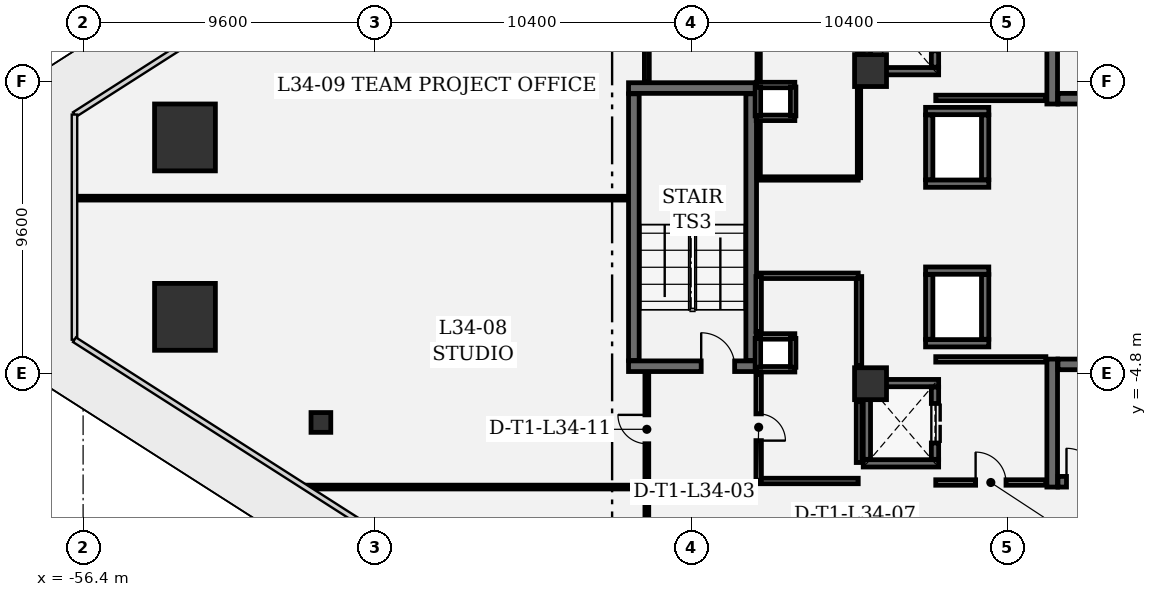
"""IFC4 building model, lengths in metres.
Left out: names, types, materials, properties, quantities, classifications, styles, units other than length and angle.
Written with IfcOpenShell. Run it as: python <this file> out.ifc"""

import sys

from ifc_helpers import new_model, si_unit, direction, frame, frame_2d, origin, origin_2d, place, context, subcontext, project, spatial, rectangle, extrude, element, fill, save


model = new_model("IFC4")
c1 = context("Model", 3, precision=1e-05, world=origin(), true_north=direction((0.0, 1.0)))
c2 = subcontext(c1, "Body", "Model", "MODEL_VIEW")
j1 = project(units=[si_unit("LENGTHUNIT", "METRE"), si_unit("PLANEANGLEUNIT", "RADIAN")], contexts=[c1])
p1 = place(None, origin())
s1 = spatial("IfcSite", under=j1, at=p1, CompositionType="ELEMENT")
p2 = place(p1, origin())
s2 = spatial("IfcBuilding", under=s1, at=p2, CompositionType="ELEMENT")
p3 = place(p2, frame((0.0, 0.0, 150.3)))
s3 = spatial("IfcBuildingStorey", under=s2, at=p3, CompositionType="ELEMENT", Elevation=150.3)
for number, where, z_axis, x_axis in (
    (1, (-53.049, 2.951, 0.0), (0.0, 0.0, 1.0), (1.0, 0.0, 0.0)),
    (2, (-53.049, -2.951, 0.0), (0.0, 0.0, 1.0), (1.0, 0.0, 0.0)),
):
    element("IfcColumn", number, at=place(p3, frame(where, z_axis=z_axis, x_axis=x_axis)), inside=s3, PredefinedType="COLUMN", context=c2, shape_type="SweptSolid", body=[
        extrude(rectangle(XDim=2.0, YDim=2.2, at=origin_2d()), origin(), (0.0, 0.0, 1.0), 4.05),
    ])
for number, where, z_axis, x_axis in (
    (3, (-30.5, 5.15, 0.0), (0.0, 0.0, 1.0), (1.0, 0.0, 0.0)),
    (4, (-30.5, -5.15, 0.0), (0.0, 0.0, 1.0), (1.0, 0.0, 0.0)),
):
    element("IfcColumn", number, at=place(p3, frame(where, z_axis=z_axis, x_axis=x_axis)), inside=s3, PredefinedType="COLUMN", context=c2, shape_type="SweptSolid", body=[
        extrude(rectangle(XDim=1.05, YDim=1.05, at=origin_2d()), origin(), (0.0, 0.0, 1.0), 4.05),
    ])
p4 = place(p3, frame((-48.578, -6.425, 0.0), z_axis=(0.0, 0.0, 1.0), x_axis=(1.0, 0.0, 0.0)))
e5 = element("IfcColumn", 5, at=p4, inside=s3, PredefinedType="COLUMN", context=c2, shape_type="SweptSolid", body=[
    extrude(rectangle(XDim=0.65, YDim=0.65, at=origin_2d()), origin(), (0.0, 0.0, 1.0), 4.05),
])
p5 = place(p3, frame((-24.525, 8.26, 0.0), z_axis=(0.0, 0.0, 1.0), x_axis=(0.0, -1.0, 0.0)))
e6 = element("IfcWall", 6, at=p5, inside=s3, PredefinedType="SHEAR", context=c2, shape_type="SweptSolid", body=[
    extrude(rectangle(XDim=4.21, YDim=0.35, at=frame_2d((2.105, 0.0))), origin(), (0.0, 0.0, 1.0), 3.78),
])
p6 = place(p3, frame((-24.335, 4.225, 0.0), z_axis=(0.0, 0.0, 1.0), x_axis=(1.0, 0.0, 0.0)))
e7 = element("IfcWall", 7, at=p6, inside=s3, PredefinedType="SHEAR", context=c2, shape_type="SweptSolid", body=[
    extrude(rectangle(XDim=8.12, YDim=0.35, at=frame_2d((4.06, 0.0))), origin(), (0.0, 0.0, 1.0), 3.78),
])
p7 = place(p3, frame((-24.525, -4.34, 0.0), z_axis=(0.0, 0.0, 1.0), x_axis=(0.0, -1.0, 0.0)))
e8 = element("IfcWall", 8, at=p7, inside=s3, PredefinedType="SHEAR", context=c2, shape_type="SweptSolid", body=[
    extrude(rectangle(XDim=4.21, YDim=0.35, at=frame_2d((2.105, 0.0))), origin(), (0.0, 0.0, 1.0), 3.78),
])
p8 = place(p3, frame((-24.335, -8.375, 0.0), z_axis=(0.0, 0.0, 1.0), x_axis=(1.0, 0.0, 0.0)))
e9 = element("IfcWall", 9, at=p8, inside=s3, PredefinedType="SHEAR", context=c2, shape_type="SweptSolid", body=[
    extrude(rectangle(XDim=8.12, YDim=0.35, at=frame_2d((4.06, 0.0))), origin(), (0.0, 0.0, 1.0), 3.78),
])
p9 = place(p8, frame((0.28, 0.0, 0.0)))
e10 = element("IfcOpeningElement", 10, at=p9, cuts=e9, PredefinedType="OPENING", context=c2, shape_type="SweptSolid", body=[
    extrude(rectangle(XDim=1.1, YDim=2.2, at=frame_2d((0.55, 1.1))), frame((0.0, 0.185, 0.0), z_axis=(0.0, -1.0, 0.0), x_axis=(1.0, 0.0, 0.0)), (0.0, 0.0, 1.0), 0.37),
])
p10 = place(p3, frame((-16.215, -4.515, 0.0), z_axis=(0.0, 0.0, 1.0), x_axis=(-1.0, 0.0, 0.0)))
e11 = element("IfcWall", 11, at=p10, inside=s3, PredefinedType="SHEAR", context=c2, shape_type="SweptSolid", body=[
    extrude(rectangle(XDim=8.12, YDim=0.35, at=frame_2d((4.06, 0.0))), origin(), (0.0, 0.0, 1.0), 3.78),
])
p11 = place(p3, frame((-38.46, -4.575, 0.0), z_axis=(0.0, 0.0, 1.0), x_axis=(1.0, 0.0, 0.0)))
e12 = element("IfcWall", 12, at=p11, inside=s3, PredefinedType="SHEAR", context=c2, shape_type="SweptSolid", body=[
    extrude(rectangle(XDim=4.21, YDim=0.35, at=frame_2d((2.105, 0.0))), origin(), (0.0, 0.0, 1.0), 3.78),
])
p12 = place(p11, frame((2.39, 0.0, 0.0)))
e13 = element("IfcOpeningElement", 13, at=p12, cuts=e12, PredefinedType="OPENING", context=c2, shape_type="SweptSolid", body=[
    extrude(rectangle(XDim=1.1, YDim=2.2, at=frame_2d((0.55, 1.1))), frame((0.0, 0.185, 0.0), z_axis=(0.0, -1.0, 0.0), x_axis=(1.0, 0.0, 0.0)), (0.0, 0.0, 1.0), 0.37),
])
p13 = place(p3, frame((-34.25, 4.575, 0.0), z_axis=(0.0, 0.0, 1.0), x_axis=(-1.0, 0.0, 0.0)))
e14 = element("IfcWall", 14, at=p13, inside=s3, PredefinedType="SHEAR", context=c2, shape_type="SweptSolid", body=[
    extrude(rectangle(XDim=4.21, YDim=0.35, at=frame_2d((2.105, 0.0))), origin(), (0.0, 0.0, 1.0), 3.78),
])
for number, where, z_axis, x_axis in (
    (15, (-34.425, -4.385, 0.0), (0.0, 0.0, 1.0), (0.0, 1.0, 0.0)),
    (16, (-38.285, 4.385, 0.0), (0.0, 0.0, 1.0), (0.0, -1.0, 0.0)),
):
    element("IfcWall", number, at=place(p3, frame(where, z_axis=z_axis, x_axis=x_axis)), inside=s3, PredefinedType="SHEAR", context=c2, shape_type="SweptSolid", body=[
        extrude(rectangle(XDim=8.77, YDim=0.35, at=frame_2d((4.385, 0.0))), origin(), (0.0, 0.0, 1.0), 3.78),
    ])
p14 = place(p3, frame((-28.26, 5.13, 0.0), z_axis=(0.0, 0.0, 1.0), x_axis=(-1.0, 0.0, 0.0)))
e17 = element("IfcWall", 17, at=p14, inside=s3, PredefinedType="SHEAR", context=c2, shape_type="SweptSolid", body=[
    extrude(rectangle(XDim=2.48, YDim=0.24, at=frame_2d((1.24, 0.0))), origin(), (0.0, 0.0, 1.0), 3.78),
])
p15 = place(p3, frame((-30.62, 5.262, 0.0), z_axis=(0.0, 0.0, 1.0), x_axis=(0.0, 1.0, 0.0)))
e18 = element("IfcWall", 18, at=p15, inside=s3, PredefinedType="SHEAR", context=c2, shape_type="SweptSolid", body=[
    extrude(rectangle(XDim=2.376, YDim=0.24, at=frame_2d((1.188, 0.0))), origin(), (0.0, 0.0, 1.0), 3.78),
])
p16 = place(p3, frame((-28.38, 7.638, 0.0), z_axis=(0.0, 0.0, 1.0), x_axis=(0.0, -1.0, 0.0)))
e19 = element("IfcWall", 19, at=p16, inside=s3, PredefinedType="SHEAR", context=c2, shape_type="SweptSolid", body=[
    extrude(rectangle(XDim=2.376, YDim=0.24, at=frame_2d((1.188, 0.0))), origin(), (0.0, 0.0, 1.0), 3.78),
])
p17 = place(p16, frame((0.538, 0.0, 0.0)))
e20 = element("IfcOpeningElement", 20, at=p17, cuts=e19, PredefinedType="OPENING", context=c2, shape_type="SweptSolid", body=[
    extrude(rectangle(XDim=1.3, YDim=2.3, at=frame_2d((0.65, 1.15))), frame((0.0, 0.13, 0.0), z_axis=(0.0, -1.0, 0.0), x_axis=(1.0, 0.0, 0.0)), (0.0, 0.0, 1.0), 0.26),
])
for number, where, z_axis, x_axis in (
    (21, (-28.26, -7.77, 0.0), (0.0, 0.0, 1.0), (-1.0, 0.0, 0.0)),
    (22, (-30.74, -5.13, 0.0), (0.0, 0.0, 1.0), (1.0, 0.0, 0.0)),
):
    element("IfcWall", number, at=place(p3, frame(where, z_axis=z_axis, x_axis=x_axis)), inside=s3, PredefinedType="SHEAR", context=c2, shape_type="SweptSolid", body=[
        extrude(rectangle(XDim=2.48, YDim=0.24, at=frame_2d((1.24, 0.0))), origin(), (0.0, 0.0, 1.0), 3.78),
    ])
p18 = place(p3, frame((-30.62, -7.638, 0.0), z_axis=(0.0, 0.0, 1.0), x_axis=(0.0, 1.0, 0.0)))
e23 = element("IfcWall", 23, at=p18, inside=s3, PredefinedType="SHEAR", context=c2, shape_type="SweptSolid", body=[
    extrude(rectangle(XDim=2.376, YDim=0.24, at=frame_2d((1.188, 0.0))), origin(), (0.0, 0.0, 1.0), 3.78),
])
p19 = place(p3, frame((-28.38, -5.262, 0.0), z_axis=(0.0, 0.0, 1.0), x_axis=(0.0, -1.0, 0.0)))
e24 = element("IfcWall", 24, at=p19, inside=s3, PredefinedType="SHEAR", context=c2, shape_type="SweptSolid", body=[
    extrude(rectangle(XDim=2.376, YDim=0.24, at=frame_2d((1.188, 0.0))), origin(), (0.0, 0.0, 1.0), 3.78),
])
p20 = place(p19, frame((0.538, 0.0, 0.0)))
e25 = element("IfcOpeningElement", 25, at=p20, cuts=e24, PredefinedType="OPENING", context=c2, shape_type="SweptSolid", body=[
    extrude(rectangle(XDim=1.3, YDim=2.3, at=frame_2d((0.65, 1.15))), frame((0.0, 0.13, 0.0), z_axis=(0.0, -1.0, 0.0), x_axis=(1.0, 0.0, 0.0)), (0.0, 0.0, 1.0), 0.26),
])
for number, where, z_axis, x_axis in (
    (26, (-26.61, 1.43, 0.0), (0.0, 0.0, 1.0), (-1.0, 0.0, 0.0)),
    (27, (-28.69, 3.82, 0.0), (0.0, 0.0, 1.0), (1.0, 0.0, 0.0)),
):
    element("IfcWall", number, at=place(p3, frame(where, z_axis=z_axis, x_axis=x_axis)), inside=s3, PredefinedType="SHEAR", context=c2, shape_type="SweptSolid", body=[
        extrude(rectangle(XDim=2.08, YDim=0.24, at=frame_2d((1.04, 0.0))), origin(), (0.0, 0.0, 1.0), 3.78),
    ])
for number, where, z_axis, x_axis in (
    (28, (-28.57, 1.562, 0.0), (0.0, 0.0, 1.0), (0.0, 1.0, 0.0)),
    (29, (-26.73, 3.688, 0.0), (0.0, 0.0, 1.0), (0.0, -1.0, 0.0)),
):
    element("IfcWall", number, at=place(p3, frame(where, z_axis=z_axis, x_axis=x_axis)), inside=s3, PredefinedType="SHEAR", context=c2, shape_type="SweptSolid", body=[
        extrude(rectangle(XDim=2.126, YDim=0.24, at=frame_2d((1.063, 0.0))), origin(), (0.0, 0.0, 1.0), 3.78),
    ])
for number, where, z_axis, x_axis in (
    (30, (-26.61, -3.82, 0.0), (0.0, 0.0, 1.0), (-1.0, 0.0, 0.0)),
    (31, (-28.69, -1.43, 0.0), (0.0, 0.0, 1.0), (1.0, 0.0, 0.0)),
):
    element("IfcWall", number, at=place(p3, frame(where, z_axis=z_axis, x_axis=x_axis)), inside=s3, PredefinedType="SHEAR", context=c2, shape_type="SweptSolid", body=[
        extrude(rectangle(XDim=2.08, YDim=0.24, at=frame_2d((1.04, 0.0))), origin(), (0.0, 0.0, 1.0), 3.78),
    ])
for number, where, z_axis, x_axis in (
    (32, (-28.57, -3.688, 0.0), (0.0, 0.0, 1.0), (0.0, 1.0, 0.0)),
    (33, (-26.73, -1.562, 0.0), (0.0, 0.0, 1.0), (0.0, -1.0, 0.0)),
):
    element("IfcWall", number, at=place(p3, frame(where, z_axis=z_axis, x_axis=x_axis)), inside=s3, PredefinedType="SHEAR", context=c2, shape_type="SweptSolid", body=[
        extrude(rectangle(XDim=2.126, YDim=0.24, at=frame_2d((1.063, 0.0))), origin(), (0.0, 0.0, 1.0), 3.78),
    ])
for number, where, z_axis, x_axis in (
    (34, (-32.99, 3.595, 0.0), (0.0, 0.0, 1.0), (-1.0, 0.0, 0.0)),
    (35, (-34.26, 4.675, 0.0), (0.0, 0.0, 1.0), (1.0, 0.0, 0.0)),
):
    element("IfcWall", number, at=place(p3, frame(where, z_axis=z_axis, x_axis=x_axis)), inside=s3, PredefinedType="PARTITIONING", context=c2, shape_type="SweptSolid", body=[
        extrude(rectangle(XDim=1.27, YDim=0.18, at=frame_2d((0.635, 0.0))), origin(), (0.0, 0.0, 1.0), 3.78),
    ])
for number, where, z_axis, x_axis in (
    (36, (-34.205, 3.66, 0.0), (0.0, 0.0, 1.0), (0.0, 1.0, 0.0)),
    (37, (-33.045, 4.61, 0.0), (0.0, 0.0, 1.0), (0.0, -1.0, 0.0)),
):
    element("IfcWall", number, at=place(p3, frame(where, z_axis=z_axis, x_axis=x_axis)), inside=s3, PredefinedType="PARTITIONING", context=c2, shape_type="SweptSolid", body=[
        extrude(rectangle(XDim=0.95, YDim=0.18, at=frame_2d((0.475, 0.0))), origin(), (0.0, 0.0, 1.0), 3.78),
    ])
for number, where, z_axis, x_axis in (
    (38, (-32.99, -4.675, 0.0), (0.0, 0.0, 1.0), (-1.0, 0.0, 0.0)),
    (39, (-34.26, -3.595, 0.0), (0.0, 0.0, 1.0), (1.0, 0.0, 0.0)),
):
    element("IfcWall", number, at=place(p3, frame(where, z_axis=z_axis, x_axis=x_axis)), inside=s3, PredefinedType="PARTITIONING", context=c2, shape_type="SweptSolid", body=[
        extrude(rectangle(XDim=1.27, YDim=0.18, at=frame_2d((0.635, 0.0))), origin(), (0.0, 0.0, 1.0), 3.78),
    ])
for number, where, z_axis, x_axis in (
    (40, (-34.205, -4.61, 0.0), (0.0, 0.0, 1.0), (0.0, 1.0, 0.0)),
    (41, (-33.045, -3.66, 0.0), (0.0, 0.0, 1.0), (0.0, -1.0, 0.0)),
):
    element("IfcWall", number, at=place(p3, frame(where, z_axis=z_axis, x_axis=x_axis)), inside=s3, PredefinedType="PARTITIONING", context=c2, shape_type="SweptSolid", body=[
        extrude(rectangle(XDim=0.95, YDim=0.18, at=frame_2d((0.475, 0.0))), origin(), (0.0, 0.0, 1.0), 3.78),
    ])
p21 = place(p3, frame((-28.355, 4.25, 0.0), z_axis=(0.0, 0.0, 1.0), x_axis=(1.0, 0.0, 0.0)))
e42 = element("IfcWall", 42, at=p21, inside=s3, PredefinedType="PARTITIONING", context=c2, shape_type="SweptSolid", body=[
    extrude(rectangle(XDim=3.622, YDim=0.18, at=frame_2d((1.811, 0.0))), origin(), (0.0, 0.0, 1.0), 3.78),
])
p22 = place(p3, frame((-28.355, -8.4, 0.0), z_axis=(0.0, 0.0, 1.0), x_axis=(1.0, 0.0, 0.0)))
e43 = element("IfcWall", 43, at=p22, inside=s3, PredefinedType="PARTITIONING", context=c2, shape_type="SweptSolid", body=[
    extrude(rectangle(XDim=3.622, YDim=0.18, at=frame_2d((1.811, 0.0))), origin(), (0.0, 0.0, 1.0), 3.78),
])
p23 = place(p22, frame((1.311, 0.0, 0.0)))
e44 = element("IfcOpeningElement", 44, at=p23, cuts=e43, PredefinedType="OPENING", context=c2, shape_type="SweptSolid", body=[
    extrude(rectangle(XDim=1.0, YDim=2.15, at=frame_2d((0.5, 1.075))), frame((0.0, 0.1, 0.0), z_axis=(0.0, -1.0, 0.0), x_axis=(1.0, 0.0, 0.0)), (0.0, 0.0, 1.0), 0.2),
])
p24 = place(p3, frame((-24.733, -4.35, 0.0), z_axis=(0.0, 0.0, 1.0), x_axis=(-1.0, 0.0, 0.0)))
e45 = element("IfcWall", 45, at=p24, inside=s3, PredefinedType="PARTITIONING", context=c2, shape_type="SweptSolid", body=[
    extrude(rectangle(XDim=3.622, YDim=0.18, at=frame_2d((1.811, 0.0))), origin(), (0.0, 0.0, 1.0), 3.78),
])
p25 = place(p3, frame((-34.155, 1.6, 0.0), z_axis=(0.0, 0.0, 1.0), x_axis=(1.0, 0.0, 0.0)))
e46 = element("IfcWall", 46, at=p25, inside=s3, PredefinedType="PARTITIONING", context=c2, shape_type="SweptSolid", body=[
    extrude(rectangle(XDim=3.25, YDim=0.11, at=frame_2d((1.625, 0.0))), origin(), (0.0, 0.0, 1.0), 3.78),
])
p26 = place(p3, frame((-30.88, 1.625, 0.0), z_axis=(0.0, 0.0, 1.0), x_axis=(0.0, 1.0, 0.0)))
e47 = element("IfcWall", 47, at=p26, inside=s3, PredefinedType="PARTITIONING", context=c2, shape_type="SweptSolid", body=[
    extrude(rectangle(XDim=2.935, YDim=0.11, at=frame_2d((1.468, 0.0))), origin(), (0.0, 0.0, 1.0), 3.78),
])
p27 = place(p3, frame((-30.88, 5.74, 0.0), z_axis=(0.0, 0.0, 1.0), x_axis=(0.0, 1.0, 0.0)))
e48 = element("IfcWall", 48, at=p27, inside=s3, PredefinedType="PARTITIONING", context=c2, shape_type="SweptSolid", body=[
    extrude(rectangle(XDim=2.003, YDim=0.11, at=frame_2d((1.001, 0.0))), origin(), (0.0, 0.0, 1.0), 3.78),
])
p28 = place(p3, frame((-34.18, 8.225, 0.0), z_axis=(0.0, 0.0, 1.0), x_axis=(0.0, -1.0, 0.0)))
e49 = element("IfcWall", 49, at=p28, inside=s3, PredefinedType="PARTITIONING", context=c2, shape_type="SweptSolid", body=[
    extrude(rectangle(XDim=3.385, YDim=0.11, at=frame_2d((1.692, 0.0))), origin(), (0.0, 0.0, 1.0), 3.78),
])
p29 = place(p28, frame((1.252, 0.0, 0.0)))
e50 = element("IfcOpeningElement", 50, at=p29, cuts=e49, PredefinedType="OPENING", context=c2, shape_type="SweptSolid", body=[
    extrude(rectangle(XDim=0.88, YDim=2.1, at=frame_2d((0.44, 1.05))), frame((0.0, 0.065, 0.0), z_axis=(0.0, -1.0, 0.0), x_axis=(1.0, 0.0, 0.0)), (0.0, 0.0, 1.0), 0.13),
])
p30 = place(p3, frame((-34.18, 3.43, 0.0), z_axis=(0.0, 0.0, 1.0), x_axis=(0.0, -1.0, 0.0)))
e51 = element("IfcWall", 51, at=p30, inside=s3, PredefinedType="PARTITIONING", context=c2, shape_type="SweptSolid", body=[
    extrude(rectangle(XDim=1.805, YDim=0.11, at=frame_2d((0.902, 0.0))), origin(), (0.0, 0.0, 1.0), 3.78),
])
p31 = place(p3, frame((-34.155, -8.35, 0.0), z_axis=(0.0, 0.0, 1.0), x_axis=(1.0, 0.0, 0.0)))
e52 = element("IfcWall", 52, at=p31, inside=s3, PredefinedType="PARTITIONING", context=c2, shape_type="SweptSolid", body=[
    extrude(rectangle(XDim=3.25, YDim=0.18, at=frame_2d((1.625, 0.0))), origin(), (0.0, 0.0, 1.0), 3.78),
])
p32 = place(p3, frame((-30.88, -7.743, 0.0), z_axis=(0.0, 0.0, 1.0), x_axis=(0.0, 1.0, 0.0)))
e53 = element("IfcWall", 53, at=p32, inside=s3, PredefinedType="PARTITIONING", context=c2, shape_type="SweptSolid", body=[
    extrude(rectangle(XDim=2.003, YDim=0.18, at=frame_2d((1.001, 0.0))), origin(), (0.0, 0.0, 1.0), 3.78),
])
p33 = place(p3, frame((-30.88, -4.56, 0.0), z_axis=(0.0, 0.0, 1.0), x_axis=(0.0, 1.0, 0.0)))
e54 = element("IfcWall", 54, at=p33, inside=s3, PredefinedType="PARTITIONING", context=c2, shape_type="SweptSolid", body=[
    extrude(rectangle(XDim=2.935, YDim=0.18, at=frame_2d((1.468, 0.0))), origin(), (0.0, 0.0, 1.0), 3.78),
])
p34 = place(p3, frame((-30.905, -1.6, 0.0), z_axis=(0.0, 0.0, 1.0), x_axis=(-1.0, 0.0, 0.0)))
e55 = element("IfcWall", 55, at=p34, inside=s3, PredefinedType="PARTITIONING", context=c2, shape_type="SweptSolid", body=[
    extrude(rectangle(XDim=3.25, YDim=0.18, at=frame_2d((1.625, 0.0))), origin(), (0.0, 0.0, 1.0), 3.78),
])
p35 = place(p3, frame((-34.18, -1.625, 0.0), z_axis=(0.0, 0.0, 1.0), x_axis=(0.0, -1.0, 0.0)))
e56 = element("IfcWall", 56, at=p35, inside=s3, PredefinedType="PARTITIONING", context=c2, shape_type="SweptSolid", body=[
    extrude(rectangle(XDim=1.805, YDim=0.18, at=frame_2d((0.902, 0.0))), origin(), (0.0, 0.0, 1.0), 3.78),
])
p36 = place(p3, frame((-34.18, -4.84, 0.0), z_axis=(0.0, 0.0, 1.0), x_axis=(0.0, -1.0, 0.0)))
e57 = element("IfcWall", 57, at=p36, inside=s3, PredefinedType="PARTITIONING", context=c2, shape_type="SweptSolid", body=[
    extrude(rectangle(XDim=3.485, YDim=0.18, at=frame_2d((1.743, 0.0))), origin(), (0.0, 0.0, 1.0), 3.78),
])
p37 = place(p36, frame((1.302, 0.0, 0.0)))
e58 = element("IfcOpeningElement", 58, at=p37, cuts=e57, PredefinedType="OPENING", context=c2, shape_type="SweptSolid", body=[
    extrude(rectangle(XDim=0.88, YDim=2.1, at=frame_2d((0.44, 1.05))), frame((0.0, 0.1, 0.0), z_axis=(0.0, -1.0, 0.0), x_axis=(1.0, 0.0, 0.0)), (0.0, 0.0, 1.0), 0.2),
])
p38 = place(p3, frame((-37.858, -8.575, 0.0), z_axis=(0.0, 0.0, 1.0), x_axis=(0.0, -1.0, 0.0)))
e59 = element("IfcWall", 59, at=p38, inside=s3, PredefinedType="PARTITIONING", context=c2, shape_type="SweptSolid", body=[
    extrude(rectangle(XDim=2.358, YDim=0.125, at=frame_2d((1.179, 0.0))), origin(), (0.0, 0.0, 1.0), 3.78),
])
p39 = place(p3, frame((-37.883, -8.55, 0.0), z_axis=(0.0, 0.0, 1.0), x_axis=(-1.0, 0.0, 0.0)))
e60 = element("IfcWall", 60, at=p39, inside=s3, PredefinedType="PARTITIONING", context=c2, shape_type="SweptSolid", body=[
    extrude(rectangle(XDim=11.137, YDim=0.125, at=frame_2d((5.569, 0.0))), origin(), (0.0, 0.0, 1.0), 2.9),
])
p40 = place(p3, frame((-37.858, -8.517, 0.0), z_axis=(0.0, 0.0, 1.0), x_axis=(0.0, 1.0, 0.0)))
e61 = element("IfcWall", 61, at=p40, inside=s3, PredefinedType="PARTITIONING", context=c2, shape_type="SweptSolid", body=[
    extrude(rectangle(XDim=3.734, YDim=0.125, at=frame_2d((1.867, 0.0))), origin(), (0.0, 0.0, 1.0), 3.78),
])
p41 = place(p40, frame((1.392, 0.0, 0.0)))
e62 = element("IfcOpeningElement", 62, at=p41, cuts=e61, PredefinedType="OPENING", context=c2, shape_type="SweptSolid", body=[
    extrude(rectangle(XDim=0.95, YDim=2.15, at=frame_2d((0.475, 1.075))), frame((0.0, 0.073, 0.0), z_axis=(0.0, -1.0, 0.0), x_axis=(1.0, 0.0, 0.0)), (0.0, 0.0, 1.0), 0.145),
])
p42 = place(p3, frame((-38.493, 0.953, 0.0), z_axis=(0.0, 0.0, 1.0), x_axis=(-1.0, 0.0, 0.0)))
e63 = element("IfcWall", 63, at=p42, inside=s3, PredefinedType="PARTITIONING", context=c2, shape_type="SweptSolid", body=[
    extrude(rectangle(XDim=18.111, YDim=0.125, at=frame_2d((9.055, 0.0))), origin(), (0.0, 0.0, 1.0), 3.78),
])
p43 = place(p3, frame((-37.858, 4.783, 0.0), z_axis=(0.0, 0.0, 1.0), x_axis=(0.0, 1.0, 0.0)))
e64 = element("IfcWall", 64, at=p43, inside=s3, PredefinedType="PARTITIONING", context=c2, shape_type="SweptSolid", body=[
    extrude(rectangle(XDim=3.534, YDim=0.16, at=frame_2d((1.767, 0.0))), origin(), (0.0, 0.0, 1.0), 3.78),
])
p44 = place(p43, frame((1.217, 0.0, 0.0)))
e65 = element("IfcOpeningElement", 65, at=p44, cuts=e64, PredefinedType="OPENING", context=c2, shape_type="SweptSolid", body=[
    extrude(rectangle(XDim=1.1, YDim=2.15, at=frame_2d((0.55, 1.075))), frame((0.0, 0.09, 0.0), z_axis=(0.0, -1.0, 0.0), x_axis=(1.0, 0.0, 0.0)), (0.0, 0.0, 1.0), 0.18),
])
p45 = place(p9, origin())
e66 = element("IfcDoor", 66, at=p45, inside=s3, OperationType="SINGLE_SWING_LEFT", PredefinedType="DOOR", context=c2, shape_type="SweptSolid", body=[
    extrude(rectangle(XDim=1.1, YDim=2.2, at=frame_2d((0.55, 1.1))), frame((0.0, 0.025, 0.0), z_axis=(0.0, -1.0, 0.0), x_axis=(1.0, 0.0, 0.0)), (0.0, 0.0, 1.0), 0.05),
])
fill(e10, e66)
p46 = place(p12, origin())
e67 = element("IfcDoor", 67, at=p46, inside=s3, OperationType="SINGLE_SWING_LEFT", PredefinedType="DOOR", context=c2, shape_type="SweptSolid", body=[
    extrude(rectangle(XDim=1.1, YDim=2.2, at=frame_2d((0.55, 1.1))), frame((0.0, 0.025, 0.0), z_axis=(0.0, -1.0, 0.0), x_axis=(1.0, 0.0, 0.0)), (0.0, 0.0, 1.0), 0.05),
])
fill(e13, e67)
p47 = place(p20, origin())
e68 = element("IfcDoor", 68, at=p47, inside=s3, OperationType="DOUBLE_DOOR_SLIDING", PredefinedType="DOOR", context=c2, shape_type="SweptSolid", body=[
    extrude(rectangle(XDim=1.3, YDim=2.3, at=frame_2d((0.65, 1.15))), frame((0.0, 0.025, 0.0), z_axis=(0.0, -1.0, 0.0), x_axis=(1.0, 0.0, 0.0)), (0.0, 0.0, 1.0), 0.05),
])
fill(e25, e68)
p48 = place(p37, origin())
e69 = element("IfcDoor", 69, at=p48, inside=s3, OperationType="SINGLE_SWING_RIGHT", PredefinedType="DOOR", context=c2, shape_type="SweptSolid", body=[
    extrude(rectangle(XDim=0.88, YDim=2.1, at=frame_2d((0.44, 1.05))), frame((0.0, 0.025, 0.0), z_axis=(0.0, -1.0, 0.0), x_axis=(1.0, 0.0, 0.0)), (0.0, 0.0, 1.0), 0.05),
])
fill(e58, e69)
p49 = place(p41, origin())
e70 = element("IfcDoor", 70, at=p49, inside=s3, OperationType="SINGLE_SWING_RIGHT", PredefinedType="DOOR", context=c2, shape_type="SweptSolid", body=[
    extrude(rectangle(XDim=0.95, YDim=2.15, at=frame_2d((0.475, 1.075))), frame((0.0, 0.025, 0.0), z_axis=(0.0, -1.0, 0.0), x_axis=(1.0, 0.0, 0.0)), (0.0, 0.0, 1.0), 0.05),
])
fill(e62, e70)
p50 = place(p23, origin())
e71 = element("IfcDoor", 71, at=p50, inside=s3, OperationType="SINGLE_SWING_LEFT", PredefinedType="DOOR", context=c2, shape_type="SweptSolid", body=[
    extrude(rectangle(XDim=1.0, YDim=2.15, at=frame_2d((0.5, 1.075))), frame((0.0, 0.025, 0.0), z_axis=(0.0, -1.0, 0.0), x_axis=(1.0, 0.0, 0.0)), (0.0, 0.0, 1.0), 0.05),
])
fill(e44, e71)
save(model, sys.argv[1])
